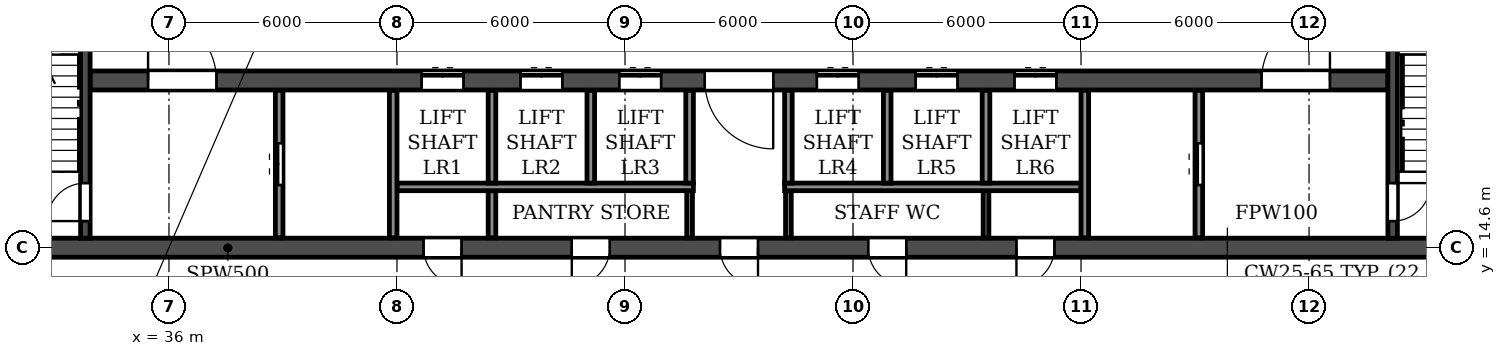
"""IFC4 building model, lengths in metres.
Left out: names, types, materials, properties, quantities, classifications, styles, units other than length and angle.
Written with IfcOpenShell. Run it as: python <this file> out.ifc"""

import sys

from ifc_helpers import new_model, si_unit, direction, frame, frame_2d, origin, place, context, subcontext, project, spatial, rectangle, extrude, element, fill, save


model = new_model("IFC4")
c1 = context("Model", 3, precision=1e-05, world=origin(), true_north=direction((0.0, 1.0)))
c2 = subcontext(c1, "Body", "Model", "MODEL_VIEW")
j1 = project(units=[si_unit("LENGTHUNIT", "METRE"), si_unit("PLANEANGLEUNIT", "RADIAN")], contexts=[c1])
p1 = place(None, origin())
s1 = spatial("IfcSite", under=j1, at=p1, CompositionType="ELEMENT")
p2 = place(p1, origin())
s2 = spatial("IfcBuilding", under=s1, at=p2, CompositionType="ELEMENT")
p3 = place(p2, frame((0.0, 0.0, 112.5)))
s3 = spatial("IfcBuildingStorey", under=s2, at=p3, CompositionType="ELEMENT", Elevation=112.5)
p4 = place(p3, frame((14.6, 14.6, 0.0), z_axis=(0.0, 0.0, 1.0), x_axis=(1.0, 0.0, 0.0)))
e1 = element("IfcWall", 1, at=p4, inside=s3, PredefinedType="SOLIDWALL", context=c2, shape_type="SweptSolid", body=[
    extrude(rectangle(XDim=72.8, YDim=0.5, at=frame_2d((36.4, 0.0))), origin(), (0.0, 0.0, 1.0), 2.95),
])
p5 = place(p4, frame((1.2, 0.0, 0.0)))
e2 = element("IfcOpeningElement", 2, at=p5, cuts=e1, PredefinedType="OPENING", context=c2, shape_type="SweptSolid", body=[
    extrude(rectangle(XDim=1.0, YDim=2.1, at=frame_2d((0.5, 1.05))), frame((0.0, 0.26, 0.0), z_axis=(0.0, -1.0, 0.0), x_axis=(1.0, 0.0, 0.0)), (0.0, 0.0, 1.0), 0.52),
])
p6 = place(p4, frame((4.3, 0.0, 0.0)))
e3 = element("IfcOpeningElement", 3, at=p6, cuts=e1, PredefinedType="OPENING", context=c2, shape_type="SweptSolid", body=[
    extrude(rectangle(XDim=1.0, YDim=2.1, at=frame_2d((0.5, 1.05))), frame((0.0, 0.26, 0.0), z_axis=(0.0, -1.0, 0.0), x_axis=(1.0, 0.0, 0.0)), (0.0, 0.0, 1.0), 0.52),
])
p7 = place(p4, frame((12.2, 0.0, 0.0)))
e4 = element("IfcOpeningElement", 4, at=p7, cuts=e1, PredefinedType="OPENING", context=c2, shape_type="SweptSolid", body=[
    extrude(rectangle(XDim=1.0, YDim=2.1, at=frame_2d((0.5, 1.05))), frame((0.0, 0.26, 0.0), z_axis=(0.0, -1.0, 0.0), x_axis=(1.0, 0.0, 0.0)), (0.0, 0.0, 1.0), 0.52),
])
p8 = place(p4, frame((16.8, 0.0, 0.0)))
e5 = element("IfcOpeningElement", 5, at=p8, cuts=e1, PredefinedType="OPENING", context=c2, shape_type="SweptSolid", body=[
    extrude(rectangle(XDim=1.0, YDim=2.1, at=frame_2d((0.5, 1.05))), frame((0.0, 0.26, 0.0), z_axis=(0.0, -1.0, 0.0), x_axis=(1.0, 0.0, 0.0)), (0.0, 0.0, 1.0), 0.52),
])
p9 = place(p4, frame((28.1, 0.0, 0.0)))
e6 = element("IfcOpeningElement", 6, at=p9, cuts=e1, PredefinedType="OPENING", context=c2, shape_type="SweptSolid", body=[
    extrude(rectangle(XDim=1.0, YDim=2.1, at=frame_2d((0.5, 1.05))), frame((0.0, 0.26, 0.0), z_axis=(0.0, -1.0, 0.0), x_axis=(1.0, 0.0, 0.0)), (0.0, 0.0, 1.0), 0.52),
])
p10 = place(p4, frame((32.0, 0.0, 0.0)))
e7 = element("IfcOpeningElement", 7, at=p10, cuts=e1, PredefinedType="OPENING", context=c2, shape_type="SweptSolid", body=[
    extrude(rectangle(XDim=1.0, YDim=2.1, at=frame_2d((0.5, 1.05))), frame((0.0, 0.26, 0.0), z_axis=(0.0, -1.0, 0.0), x_axis=(1.0, 0.0, 0.0)), (0.0, 0.0, 1.0), 0.52),
])
p11 = place(p4, frame((35.9, 0.0, 0.0)))
e8 = element("IfcOpeningElement", 8, at=p11, cuts=e1, PredefinedType="OPENING", context=c2, shape_type="SweptSolid", body=[
    extrude(rectangle(XDim=1.0, YDim=2.1, at=frame_2d((0.5, 1.05))), frame((0.0, 0.26, 0.0), z_axis=(0.0, -1.0, 0.0), x_axis=(1.0, 0.0, 0.0)), (0.0, 0.0, 1.0), 0.52),
])
p12 = place(p4, frame((39.8, 0.0, 0.0)))
e9 = element("IfcOpeningElement", 9, at=p12, cuts=e1, PredefinedType="OPENING", context=c2, shape_type="SweptSolid", body=[
    extrude(rectangle(XDim=1.0, YDim=2.1, at=frame_2d((0.5, 1.05))), frame((0.0, 0.26, 0.0), z_axis=(0.0, -1.0, 0.0), x_axis=(1.0, 0.0, 0.0)), (0.0, 0.0, 1.0), 0.52),
])
p13 = place(p4, frame((43.7, 0.0, 0.0)))
e10 = element("IfcOpeningElement", 10, at=p13, cuts=e1, PredefinedType="OPENING", context=c2, shape_type="SweptSolid", body=[
    extrude(rectangle(XDim=1.0, YDim=2.1, at=frame_2d((0.5, 1.05))), frame((0.0, 0.26, 0.0), z_axis=(0.0, -1.0, 0.0), x_axis=(1.0, 0.0, 0.0)), (0.0, 0.0, 1.0), 0.52),
])
p14 = place(p4, frame((55.0, 0.0, 0.0)))
e11 = element("IfcOpeningElement", 11, at=p14, cuts=e1, PredefinedType="OPENING", context=c2, shape_type="SweptSolid", body=[
    extrude(rectangle(XDim=1.0, YDim=2.1, at=frame_2d((0.5, 1.05))), frame((0.0, 0.26, 0.0), z_axis=(0.0, -1.0, 0.0), x_axis=(1.0, 0.0, 0.0)), (0.0, 0.0, 1.0), 0.52),
])
p15 = place(p4, frame((59.6, 0.0, 0.0)))
e12 = element("IfcOpeningElement", 12, at=p15, cuts=e1, PredefinedType="OPENING", context=c2, shape_type="SweptSolid", body=[
    extrude(rectangle(XDim=1.0, YDim=2.1, at=frame_2d((0.5, 1.05))), frame((0.0, 0.26, 0.0), z_axis=(0.0, -1.0, 0.0), x_axis=(1.0, 0.0, 0.0)), (0.0, 0.0, 1.0), 0.52),
])
p16 = place(p4, frame((67.5, 0.0, 0.0)))
e13 = element("IfcOpeningElement", 13, at=p16, cuts=e1, PredefinedType="OPENING", context=c2, shape_type="SweptSolid", body=[
    extrude(rectangle(XDim=1.0, YDim=2.1, at=frame_2d((0.5, 1.05))), frame((0.0, 0.26, 0.0), z_axis=(0.0, -1.0, 0.0), x_axis=(1.0, 0.0, 0.0)), (0.0, 0.0, 1.0), 0.52),
])
p17 = place(p4, frame((70.35, 0.0, 0.0)))
e14 = element("IfcOpeningElement", 14, at=p17, cuts=e1, PredefinedType="OPENING", context=c2, shape_type="SweptSolid", body=[
    extrude(rectangle(XDim=1.5, YDim=2.1, at=frame_2d((0.75, 1.05))), frame((0.0, 0.26, 0.0), z_axis=(0.0, -1.0, 0.0), x_axis=(1.0, 0.0, 0.0)), (0.0, 0.0, 1.0), 0.52),
])
p18 = place(p3, frame((33.925, 19.0, 0.0), z_axis=(0.0, 0.0, 1.0), x_axis=(1.0, 0.0, 0.0)))
e15 = element("IfcWall", 15, at=p18, inside=s3, PredefinedType="SOLIDWALL", context=c2, shape_type="SweptSolid", body=[
    extrude(rectangle(XDim=34.15, YDim=0.5, at=frame_2d((17.075, 0.0))), origin(), (0.0, 0.0, 1.0), 2.95),
])
p19 = place(p18, frame((16.175, 0.0, 0.0)))
e16 = element("IfcOpeningElement", 16, at=p19, cuts=e15, PredefinedType="OPENING", context=c2, shape_type="SweptSolid", body=[
    extrude(rectangle(XDim=1.8, YDim=2.1, at=frame_2d((0.9, 1.05))), frame((0.0, 0.26, 0.0), z_axis=(0.0, -1.0, 0.0), x_axis=(1.0, 0.0, 0.0)), (0.0, 0.0, 1.0), 0.52),
])
p20 = place(p18, frame((1.525, 0.0, 0.0)))
e17 = element("IfcOpeningElement", 17, at=p20, cuts=e15, PredefinedType="OPENING", context=c2, shape_type="SweptSolid", body=[
    extrude(rectangle(XDim=1.8, YDim=2.1, at=frame_2d((0.9, 1.05))), frame((0.0, 0.26, 0.0), z_axis=(0.0, -1.0, 0.0), x_axis=(1.0, 0.0, 0.0)), (0.0, 0.0, 1.0), 0.52),
])
p21 = place(p18, frame((8.725, 0.0, 0.0)))
e18 = element("IfcOpeningElement", 18, at=p21, cuts=e15, PredefinedType="OPENING", context=c2, shape_type="SweptSolid", body=[
    extrude(rectangle(XDim=1.1, YDim=2.1, at=frame_2d((0.55, 1.05))), frame((0.0, 0.26, 0.0), z_axis=(0.0, -1.0, 0.0), x_axis=(1.0, 0.0, 0.0)), (0.0, 0.0, 1.0), 0.52),
])
p22 = place(p18, frame((11.325, 0.0, 0.0)))
e19 = element("IfcOpeningElement", 19, at=p22, cuts=e15, PredefinedType="OPENING", context=c2, shape_type="SweptSolid", body=[
    extrude(rectangle(XDim=1.1, YDim=2.1, at=frame_2d((0.55, 1.05))), frame((0.0, 0.26, 0.0), z_axis=(0.0, -1.0, 0.0), x_axis=(1.0, 0.0, 0.0)), (0.0, 0.0, 1.0), 0.52),
])
p23 = place(p18, frame((13.925, 0.0, 0.0)))
e20 = element("IfcOpeningElement", 20, at=p23, cuts=e15, PredefinedType="OPENING", context=c2, shape_type="SweptSolid", body=[
    extrude(rectangle(XDim=1.1, YDim=2.1, at=frame_2d((0.55, 1.05))), frame((0.0, 0.26, 0.0), z_axis=(0.0, -1.0, 0.0), x_axis=(1.0, 0.0, 0.0)), (0.0, 0.0, 1.0), 0.52),
])
p24 = place(p18, frame((19.125, 0.0, 0.0)))
e21 = element("IfcOpeningElement", 21, at=p24, cuts=e15, PredefinedType="OPENING", context=c2, shape_type="SweptSolid", body=[
    extrude(rectangle(XDim=1.1, YDim=2.1, at=frame_2d((0.55, 1.05))), frame((0.0, 0.26, 0.0), z_axis=(0.0, -1.0, 0.0), x_axis=(1.0, 0.0, 0.0)), (0.0, 0.0, 1.0), 0.52),
])
p25 = place(p18, frame((21.725, 0.0, 0.0)))
e22 = element("IfcOpeningElement", 22, at=p25, cuts=e15, PredefinedType="OPENING", context=c2, shape_type="SweptSolid", body=[
    extrude(rectangle(XDim=1.1, YDim=2.1, at=frame_2d((0.55, 1.05))), frame((0.0, 0.26, 0.0), z_axis=(0.0, -1.0, 0.0), x_axis=(1.0, 0.0, 0.0)), (0.0, 0.0, 1.0), 0.52),
])
p26 = place(p18, frame((24.325, 0.0, 0.0)))
e23 = element("IfcOpeningElement", 23, at=p26, cuts=e15, PredefinedType="OPENING", context=c2, shape_type="SweptSolid", body=[
    extrude(rectangle(XDim=1.1, YDim=2.1, at=frame_2d((0.55, 1.05))), frame((0.0, 0.26, 0.0), z_axis=(0.0, -1.0, 0.0), x_axis=(1.0, 0.0, 0.0)), (0.0, 0.0, 1.0), 0.52),
])
p27 = place(p18, frame((30.825, 0.0, 0.0)))
e24 = element("IfcOpeningElement", 24, at=p27, cuts=e15, PredefinedType="OPENING", context=c2, shape_type="SweptSolid", body=[
    extrude(rectangle(XDim=1.8, YDim=2.1, at=frame_2d((0.9, 1.05))), frame((0.0, 0.26, 0.0), z_axis=(0.0, -1.0, 0.0), x_axis=(1.0, 0.0, 0.0)), (0.0, 0.0, 1.0), 0.52),
])
p28 = place(p3, frame((33.8, 14.85, 0.0), z_axis=(0.0, 0.0, 1.0), x_axis=(0.0, 1.0, 0.0)))
e25 = element("IfcWall", 25, at=p28, inside=s3, PredefinedType="SOLIDWALL", context=c2, shape_type="SweptSolid", body=[
    extrude(rectangle(XDim=7.625, YDim=0.25, at=frame_2d((3.812, 0.0))), origin(), (0.0, 0.0, 1.0), 2.95),
])
p29 = place(p28, frame((0.45, 0.0, 0.0)))
e26 = element("IfcOpeningElement", 26, at=p29, cuts=e25, PredefinedType="OPENING", context=c2, shape_type="SweptSolid", body=[
    extrude(rectangle(XDim=1.0, YDim=2.1, at=frame_2d((0.5, 1.05))), frame((0.0, 0.135, 0.0), z_axis=(0.0, -1.0, 0.0), x_axis=(1.0, 0.0, 0.0)), (0.0, 0.0, 1.0), 0.27),
])
p30 = place(p3, frame((68.2, 14.85, 0.0), z_axis=(0.0, 0.0, 1.0), x_axis=(0.0, 1.0, 0.0)))
e27 = element("IfcWall", 27, at=p30, inside=s3, PredefinedType="SOLIDWALL", context=c2, shape_type="SweptSolid", body=[
    extrude(rectangle(XDim=7.625, YDim=0.25, at=frame_2d((3.812, 0.0))), origin(), (0.0, 0.0, 1.0), 2.95),
])
p31 = place(p30, frame((0.45, 0.0, 0.0)))
e28 = element("IfcOpeningElement", 28, at=p31, cuts=e27, PredefinedType="OPENING", context=c2, shape_type="SweptSolid", body=[
    extrude(rectangle(XDim=1.0, YDim=2.1, at=frame_2d((0.5, 1.05))), frame((0.0, 0.135, 0.0), z_axis=(0.0, -1.0, 0.0), x_axis=(1.0, 0.0, 0.0)), (0.0, 0.0, 1.0), 0.27),
])
for number, where, z_axis, x_axis in (
    (29, (49.7, 14.86, 0.0), (0.0, 0.0, 1.0), (0.0, 1.0, 0.0)),
    (30, (52.3, 14.86, 0.0), (0.0, 0.0, 1.0), (0.0, 1.0, 0.0)),
    (31, (57.5, 14.86, 0.0), (0.0, 0.0, 1.0), (0.0, 1.0, 0.0)),
):
    element("IfcWall", number, at=place(p3, frame(where, z_axis=z_axis, x_axis=x_axis)), inside=s3, PredefinedType="PARTITIONING", context=c2, shape_type="SweptSolid", body=[
        extrude(rectangle(XDim=1.24, YDim=0.15, at=frame_2d((0.62, 0.0))), origin(), (0.0, 0.0, 1.0), 2.95),
    ])
p32 = place(p3, frame((44.5, 14.86, 0.0), z_axis=(0.0, 0.0, 1.0), x_axis=(0.0, 1.0, 0.0)))
e32 = element("IfcWall", 32, at=p32, inside=s3, PredefinedType="PARTITIONING", context=c2, shape_type="SweptSolid", body=[
    extrude(rectangle(XDim=1.24, YDim=0.2, at=frame_2d((0.62, 0.0))), origin(), (0.0, 0.0, 1.0), 2.95),
])
for number, where, z_axis, x_axis in (
    (33, (42.0, 16.2, 0.0), (0.0, 0.0, 1.0), (1.0, 0.0, 0.0)),
    (34, (52.2, 16.2, 0.0), (0.0, 0.0, 1.0), (1.0, 0.0, 0.0)),
):
    element("IfcWall", number, at=place(p3, frame(where, z_axis=z_axis, x_axis=x_axis)), inside=s3, PredefinedType="PARTITIONING", context=c2, shape_type="SweptSolid", body=[
        extrude(rectangle(XDim=7.8, YDim=0.2, at=frame_2d((3.9, 0.0))), origin(), (0.0, 0.0, 1.0), 2.95),
    ])
p33 = place(p3, frame((38.9, 14.86, 0.0), z_axis=(0.0, 0.0, 1.0), x_axis=(0.0, 1.0, 0.0)))
e35 = element("IfcWall", 35, at=p33, inside=s3, PredefinedType="PARTITIONING", context=c2, shape_type="SweptSolid", body=[
    extrude(rectangle(XDim=3.88, YDim=0.2, at=frame_2d((1.94, 0.0))), origin(), (0.0, 0.0, 1.0), 2.95),
])
p34 = place(p33, frame((1.39, 0.0, 0.0)))
e36 = element("IfcOpeningElement", 36, at=p34, cuts=e35, PredefinedType="OPENING", context=c2, shape_type="SweptSolid", body=[
    extrude(rectangle(XDim=1.1, YDim=2.1, at=frame_2d((0.55, 1.05))), frame((0.0, 0.11, 0.0), z_axis=(0.0, -1.0, 0.0), x_axis=(1.0, 0.0, 0.0)), (0.0, 0.0, 1.0), 0.22),
])
p35 = place(p3, frame((41.9, 14.86, 0.0), z_axis=(0.0, 0.0, 1.0), x_axis=(0.0, 1.0, 0.0)))
e37 = element("IfcWall", 37, at=p35, inside=s3, PredefinedType="PARTITIONING", context=c2, shape_type="SweptSolid", body=[
    extrude(rectangle(XDim=3.88, YDim=0.2, at=frame_2d((1.94, 0.0))), origin(), (0.0, 0.0, 1.0), 2.95),
])
for number, where, z_axis, x_axis in (
    (38, (44.5, 16.3, 0.0), (0.0, 0.0, 1.0), (0.0, 1.0, 0.0)),
    (39, (47.1, 16.3, 0.0), (0.0, 0.0, 1.0), (0.0, 1.0, 0.0)),
    (40, (49.7, 16.3, 0.0), (0.0, 0.0, 1.0), (0.0, 1.0, 0.0)),
    (41, (52.3, 16.3, 0.0), (0.0, 0.0, 1.0), (0.0, 1.0, 0.0)),
    (42, (54.9, 16.3, 0.0), (0.0, 0.0, 1.0), (0.0, 1.0, 0.0)),
    (43, (57.5, 16.3, 0.0), (0.0, 0.0, 1.0), (0.0, 1.0, 0.0)),
):
    element("IfcWall", number, at=place(p3, frame(where, z_axis=z_axis, x_axis=x_axis)), inside=s3, PredefinedType="PARTITIONING", context=c2, shape_type="SweptSolid", body=[
        extrude(rectangle(XDim=2.44, YDim=0.2, at=frame_2d((1.22, 0.0))), origin(), (0.0, 0.0, 1.0), 2.95),
    ])
p36 = place(p3, frame((60.1, 14.86, 0.0), z_axis=(0.0, 0.0, 1.0), x_axis=(0.0, 1.0, 0.0)))
e44 = element("IfcWall", 44, at=p36, inside=s3, PredefinedType="PARTITIONING", context=c2, shape_type="SweptSolid", body=[
    extrude(rectangle(XDim=3.88, YDim=0.2, at=frame_2d((1.94, 0.0))), origin(), (0.0, 0.0, 1.0), 2.95),
])
p37 = place(p3, frame((63.1, 14.86, 0.0), z_axis=(0.0, 0.0, 1.0), x_axis=(0.0, 1.0, 0.0)))
e45 = element("IfcWall", 45, at=p37, inside=s3, PredefinedType="PARTITIONING", context=c2, shape_type="SweptSolid", body=[
    extrude(rectangle(XDim=3.88, YDim=0.2, at=frame_2d((1.94, 0.0))), origin(), (0.0, 0.0, 1.0), 2.95),
])
p38 = place(p37, frame((1.39, 0.0, 0.0)))
e46 = element("IfcOpeningElement", 46, at=p38, cuts=e45, PredefinedType="OPENING", context=c2, shape_type="SweptSolid", body=[
    extrude(rectangle(XDim=1.1, YDim=2.1, at=frame_2d((0.55, 1.05))), frame((0.0, 0.11, 0.0), z_axis=(0.0, -1.0, 0.0), x_axis=(1.0, 0.0, 0.0)), (0.0, 0.0, 1.0), 0.22),
])
p39 = place(p9, frame((1.0, 0.0, 0.0), z_axis=(0.0, 0.0, 1.0), x_axis=(-1.0, 0.0, 0.0)))
e47 = element("IfcDoor", 47, at=p39, inside=s3, OperationType="SINGLE_SWING_LEFT", PredefinedType="DOOR", context=c2, shape_type="SweptSolid", body=[
    extrude(rectangle(XDim=1.0, YDim=2.1, at=frame_2d((0.5, 1.05))), frame((0.0, 0.025, 0.0), z_axis=(0.0, -1.0, 0.0), x_axis=(1.0, 0.0, 0.0)), (0.0, 0.0, 1.0), 0.05),
])
fill(e6, e47)
p40 = place(p10, frame((1.0, 0.0, 0.0), z_axis=(0.0, 0.0, 1.0), x_axis=(-1.0, 0.0, 0.0)))
e48 = element("IfcDoor", 48, at=p40, inside=s3, OperationType="SINGLE_SWING_RIGHT", PredefinedType="DOOR", context=c2, shape_type="SweptSolid", body=[
    extrude(rectangle(XDim=1.0, YDim=2.1, at=frame_2d((0.5, 1.05))), frame((0.0, 0.025, 0.0), z_axis=(0.0, -1.0, 0.0), x_axis=(1.0, 0.0, 0.0)), (0.0, 0.0, 1.0), 0.05),
])
fill(e7, e48)
p41 = place(p11, frame((1.0, 0.0, 0.0), z_axis=(0.0, 0.0, 1.0), x_axis=(-1.0, 0.0, 0.0)))
e49 = element("IfcDoor", 49, at=p41, inside=s3, OperationType="SINGLE_SWING_LEFT", PredefinedType="DOOR", context=c2, shape_type="SweptSolid", body=[
    extrude(rectangle(XDim=1.0, YDim=2.1, at=frame_2d((0.5, 1.05))), frame((0.0, 0.025, 0.0), z_axis=(0.0, -1.0, 0.0), x_axis=(1.0, 0.0, 0.0)), (0.0, 0.0, 1.0), 0.05),
])
fill(e8, e49)
p42 = place(p12, frame((1.0, 0.0, 0.0), z_axis=(0.0, 0.0, 1.0), x_axis=(-1.0, 0.0, 0.0)))
e50 = element("IfcDoor", 50, at=p42, inside=s3, OperationType="SINGLE_SWING_LEFT", PredefinedType="DOOR", context=c2, shape_type="SweptSolid", body=[
    extrude(rectangle(XDim=1.0, YDim=2.1, at=frame_2d((0.5, 1.05))), frame((0.0, 0.025, 0.0), z_axis=(0.0, -1.0, 0.0), x_axis=(1.0, 0.0, 0.0)), (0.0, 0.0, 1.0), 0.05),
])
fill(e9, e50)
p43 = place(p13, frame((1.0, 0.0, 0.0), z_axis=(0.0, 0.0, 1.0), x_axis=(-1.0, 0.0, 0.0)))
e51 = element("IfcDoor", 51, at=p43, inside=s3, OperationType="SINGLE_SWING_RIGHT", PredefinedType="DOOR", context=c2, shape_type="SweptSolid", body=[
    extrude(rectangle(XDim=1.0, YDim=2.1, at=frame_2d((0.5, 1.05))), frame((0.0, 0.025, 0.0), z_axis=(0.0, -1.0, 0.0), x_axis=(1.0, 0.0, 0.0)), (0.0, 0.0, 1.0), 0.05),
])
fill(e10, e51)
p44 = place(p38, origin())
e52 = element("IfcDoor", 52, at=p44, inside=s3, OperationType="DOUBLE_DOOR_SLIDING", PredefinedType="DOOR", context=c2, shape_type="SweptSolid", body=[
    extrude(rectangle(XDim=1.1, YDim=2.1, at=frame_2d((0.55, 1.05))), frame((0.0, 0.025, 0.0), z_axis=(0.0, -1.0, 0.0), x_axis=(1.0, 0.0, 0.0)), (0.0, 0.0, 1.0), 0.05),
])
fill(e46, e52)
p45 = place(p31, frame((1.0, 0.0, 0.0), z_axis=(0.0, 0.0, 1.0), x_axis=(-1.0, 0.0, 0.0)))
e53 = element("IfcDoor", 53, at=p45, inside=s3, OperationType="SINGLE_SWING_LEFT", PredefinedType="DOOR", context=c2, shape_type="SweptSolid", body=[
    extrude(rectangle(XDim=1.0, YDim=2.1, at=frame_2d((0.5, 1.05))), frame((0.0, 0.025, 0.0), z_axis=(0.0, -1.0, 0.0), x_axis=(1.0, 0.0, 0.0)), (0.0, 0.0, 1.0), 0.05),
])
fill(e28, e53)
p46 = place(p29, origin())
e54 = element("IfcDoor", 54, at=p46, inside=s3, OperationType="SINGLE_SWING_LEFT", PredefinedType="DOOR", context=c2, shape_type="SweptSolid", body=[
    extrude(rectangle(XDim=1.0, YDim=2.1, at=frame_2d((0.5, 1.05))), frame((0.0, 0.025, 0.0), z_axis=(0.0, -1.0, 0.0), x_axis=(1.0, 0.0, 0.0)), (0.0, 0.0, 1.0), 0.05),
])
fill(e26, e54)
p47 = place(p34, origin())
e55 = element("IfcDoor", 55, at=p47, inside=s3, OperationType="DOUBLE_DOOR_SLIDING", PredefinedType="DOOR", context=c2, shape_type="SweptSolid", body=[
    extrude(rectangle(XDim=1.1, YDim=2.1, at=frame_2d((0.55, 1.05))), frame((0.0, 0.025, 0.0), z_axis=(0.0, -1.0, 0.0), x_axis=(1.0, 0.0, 0.0)), (0.0, 0.0, 1.0), 0.05),
])
fill(e36, e55)
p48 = place(p19, frame((1.8, 0.0, 0.0), z_axis=(0.0, 0.0, 1.0), x_axis=(-1.0, 0.0, 0.0)))
e56 = element("IfcDoor", 56, at=p48, inside=s3, OperationType="DOUBLE_DOOR_SINGLE_SWING", PredefinedType="DOOR", context=c2, shape_type="SweptSolid", body=[
    extrude(rectangle(XDim=1.8, YDim=2.1, at=frame_2d((0.9, 1.05))), frame((0.0, 0.025, 0.0), z_axis=(0.0, -1.0, 0.0), x_axis=(1.0, 0.0, 0.0)), (0.0, 0.0, 1.0), 0.05),
])
fill(e16, e56)
p49 = place(p20, origin())
e57 = element("IfcDoor", 57, at=p49, inside=s3, OperationType="DOUBLE_DOOR_SINGLE_SWING", PredefinedType="DOOR", context=c2, shape_type="SweptSolid", body=[
    extrude(rectangle(XDim=1.8, YDim=2.1, at=frame_2d((0.9, 1.05))), frame((0.0, 0.025, 0.0), z_axis=(0.0, -1.0, 0.0), x_axis=(1.0, 0.0, 0.0)), (0.0, 0.0, 1.0), 0.05),
])
fill(e17, e57)
p50 = place(p21, origin())
e58 = element("IfcDoor", 58, at=p50, inside=s3, OperationType="DOUBLE_DOOR_SLIDING", PredefinedType="DOOR", context=c2, shape_type="SweptSolid", body=[
    extrude(rectangle(XDim=1.1, YDim=2.1, at=frame_2d((0.55, 1.05))), frame((0.0, 0.025, 0.0), z_axis=(0.0, -1.0, 0.0), x_axis=(1.0, 0.0, 0.0)), (0.0, 0.0, 1.0), 0.05),
])
fill(e18, e58)
p51 = place(p22, origin())
e59 = element("IfcDoor", 59, at=p51, inside=s3, OperationType="DOUBLE_DOOR_SLIDING", PredefinedType="DOOR", context=c2, shape_type="SweptSolid", body=[
    extrude(rectangle(XDim=1.1, YDim=2.1, at=frame_2d((0.55, 1.05))), frame((0.0, 0.025, 0.0), z_axis=(0.0, -1.0, 0.0), x_axis=(1.0, 0.0, 0.0)), (0.0, 0.0, 1.0), 0.05),
])
fill(e19, e59)
p52 = place(p23, origin())
e60 = element("IfcDoor", 60, at=p52, inside=s3, OperationType="DOUBLE_DOOR_SLIDING", PredefinedType="DOOR", context=c2, shape_type="SweptSolid", body=[
    extrude(rectangle(XDim=1.1, YDim=2.1, at=frame_2d((0.55, 1.05))), frame((0.0, 0.025, 0.0), z_axis=(0.0, -1.0, 0.0), x_axis=(1.0, 0.0, 0.0)), (0.0, 0.0, 1.0), 0.05),
])
fill(e20, e60)
p53 = place(p24, origin())
e61 = element("IfcDoor", 61, at=p53, inside=s3, OperationType="DOUBLE_DOOR_SLIDING", PredefinedType="DOOR", context=c2, shape_type="SweptSolid", body=[
    extrude(rectangle(XDim=1.1, YDim=2.1, at=frame_2d((0.55, 1.05))), frame((0.0, 0.025, 0.0), z_axis=(0.0, -1.0, 0.0), x_axis=(1.0, 0.0, 0.0)), (0.0, 0.0, 1.0), 0.05),
])
fill(e21, e61)
p54 = place(p25, origin())
e62 = element("IfcDoor", 62, at=p54, inside=s3, OperationType="DOUBLE_DOOR_SLIDING", PredefinedType="DOOR", context=c2, shape_type="SweptSolid", body=[
    extrude(rectangle(XDim=1.1, YDim=2.1, at=frame_2d((0.55, 1.05))), frame((0.0, 0.025, 0.0), z_axis=(0.0, -1.0, 0.0), x_axis=(1.0, 0.0, 0.0)), (0.0, 0.0, 1.0), 0.05),
])
fill(e22, e62)
p55 = place(p26, origin())
e63 = element("IfcDoor", 63, at=p55, inside=s3, OperationType="DOUBLE_DOOR_SLIDING", PredefinedType="DOOR", context=c2, shape_type="SweptSolid", body=[
    extrude(rectangle(XDim=1.1, YDim=2.1, at=frame_2d((0.55, 1.05))), frame((0.0, 0.025, 0.0), z_axis=(0.0, -1.0, 0.0), x_axis=(1.0, 0.0, 0.0)), (0.0, 0.0, 1.0), 0.05),
])
fill(e23, e63)
p56 = place(p27, origin())
e64 = element("IfcDoor", 64, at=p56, inside=s3, OperationType="DOUBLE_DOOR_SINGLE_SWING", PredefinedType="DOOR", context=c2, shape_type="SweptSolid", body=[
    extrude(rectangle(XDim=1.8, YDim=2.1, at=frame_2d((0.9, 1.05))), frame((0.0, 0.025, 0.0), z_axis=(0.0, -1.0, 0.0), x_axis=(1.0, 0.0, 0.0)), (0.0, 0.0, 1.0), 0.05),
])
fill(e24, e64)
save(model, sys.argv[1])
